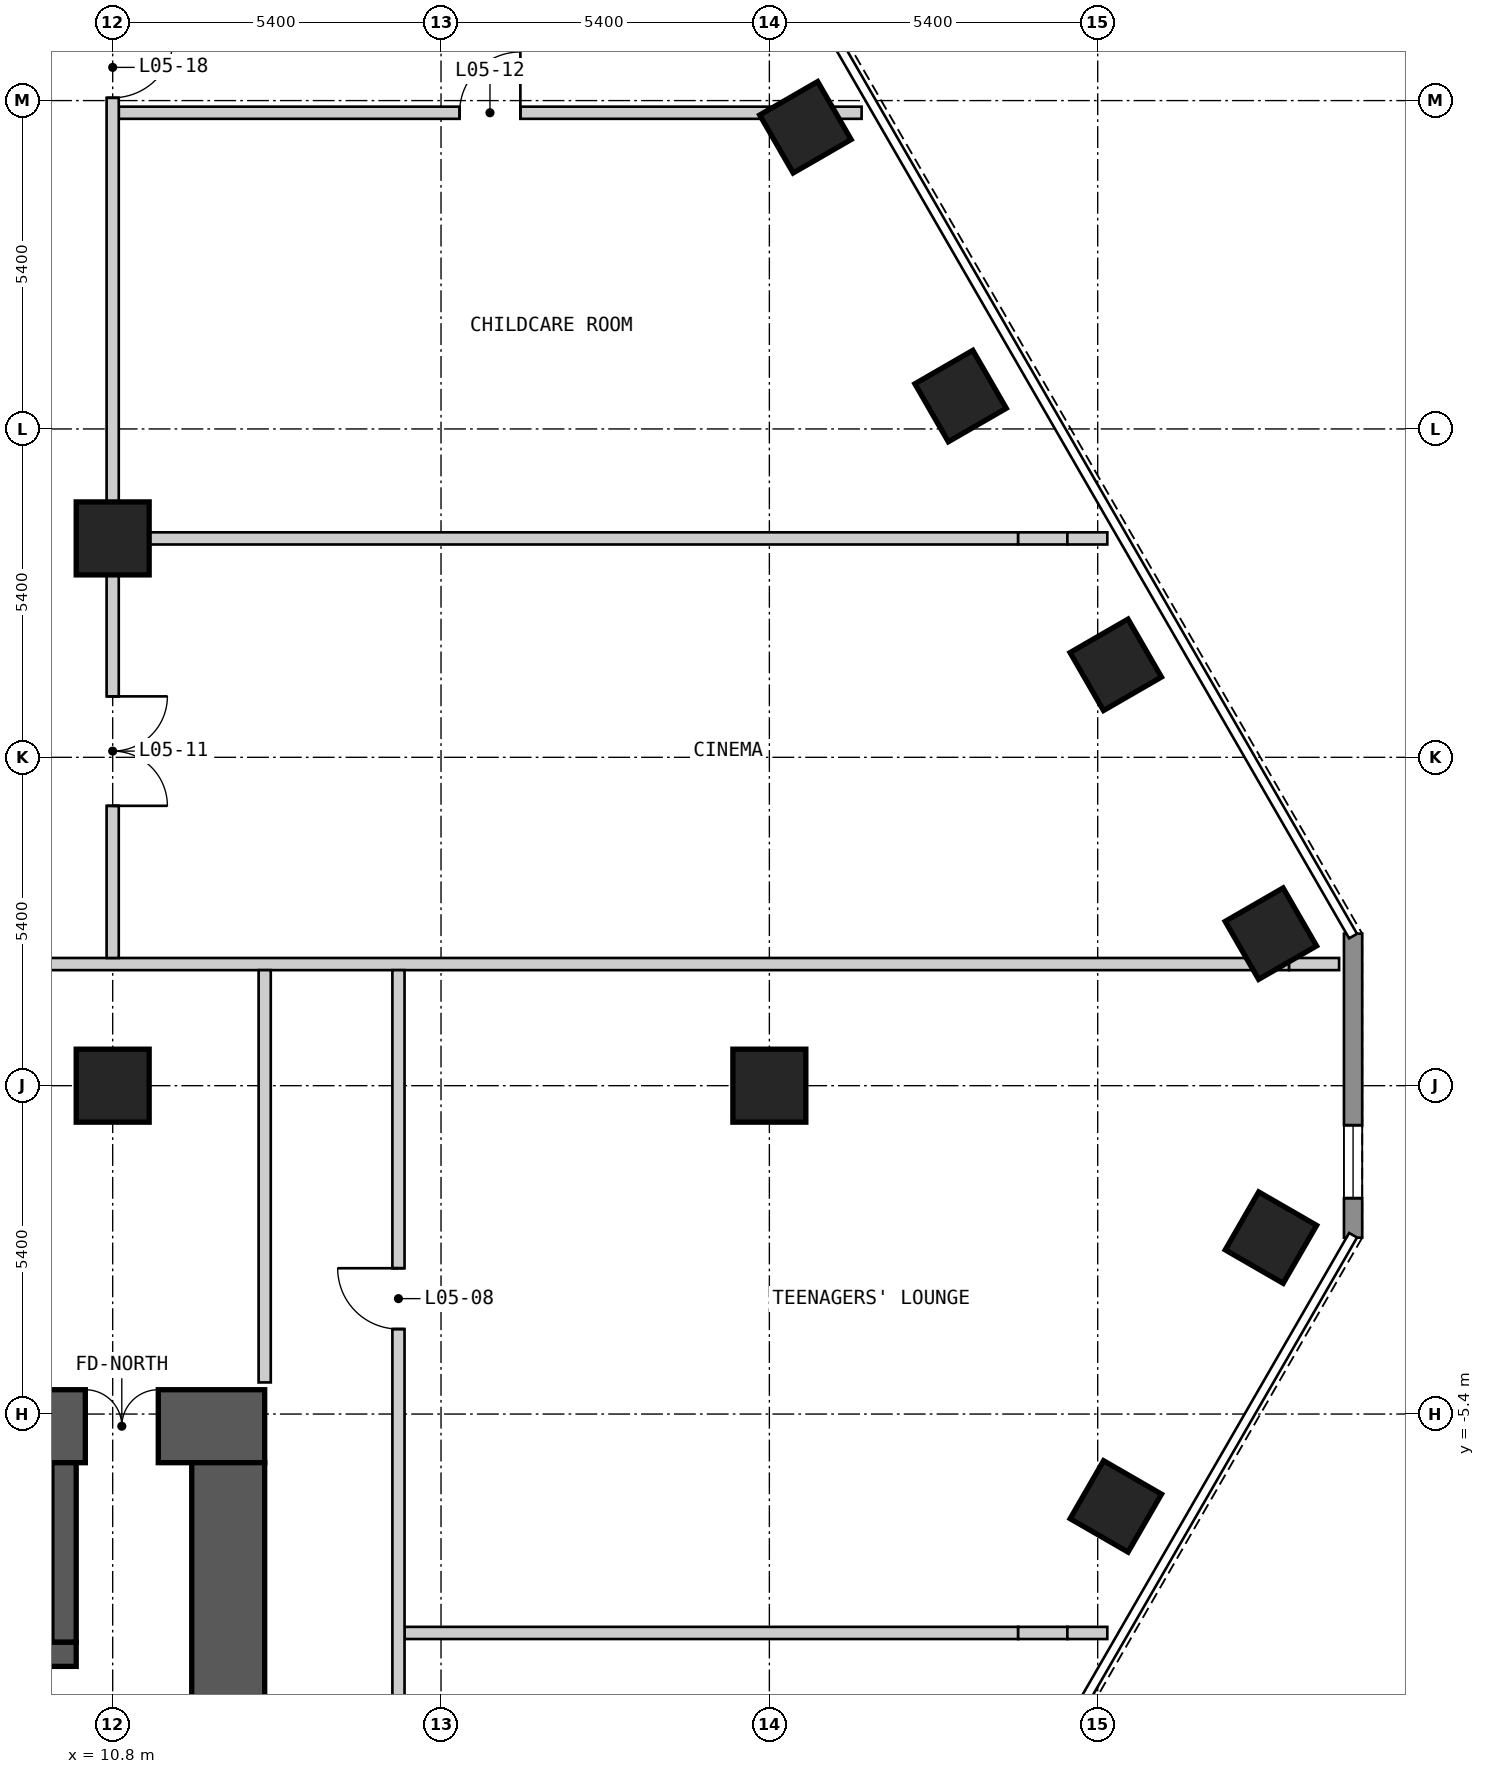
"""IFC4 building model, lengths in metres.
Left out: names, types, materials, properties, quantities, classifications, styles, units other than length and angle.
Written with IfcOpenShell. Run it as: python <this file> out.ifc"""

import sys

from ifc_helpers import new_model, si_unit, direction, frame, frame_2d, origin, origin_2d, place, context, subcontext, project, spatial, polyline, rectangle, outline, extrude, element, fill, save


model = new_model("IFC4")
c1 = context("Model", 3, precision=1e-05, world=origin(), true_north=direction((0.0, 1.0)))
c2 = subcontext(c1, "Body", "Model", "MODEL_VIEW")
j1 = project(units=[si_unit("LENGTHUNIT", "METRE"), si_unit("PLANEANGLEUNIT", "RADIAN")], contexts=[c1])
p1 = place(None, origin())
s1 = spatial("IfcSite", under=j1, at=p1, CompositionType="ELEMENT")
p2 = place(p1, origin())
s2 = spatial("IfcBuilding", under=s1, at=p2, CompositionType="ELEMENT")
p3 = place(p2, frame((0.0, 0.0, 19.8)))
s3 = spatial("IfcBuildingStorey", under=s2, at=p3, CompositionType="ELEMENT", Elevation=19.8)
for number, where, z_axis, x_axis in (
    (1, (27.298, -6.919, 0.0), (0.0, 0.0, 1.0), (0.5, 0.866, 0.0)),
    (2, (29.849, -2.499, 0.0), (0.0, 0.0, 1.0), (0.5, 0.866, 0.0)),
    (3, (29.848, 2.5, 0.0), (0.0, 0.0, 1.0), (-0.5, 0.866, 0.0)),
    (4, (27.297, 6.921, 0.0), (0.0, 0.0, 1.0), (-0.5, 0.866, 0.0)),
    (5, (24.745, 11.341, 0.0), (0.0, 0.0, 1.0), (-0.5, 0.866, 0.0)),
    (6, (22.193, 15.761, 0.0), (0.0, 0.0, 1.0), (-0.5, 0.866, 0.0)),
):
    element("IfcColumn", number, at=place(p3, frame(where, z_axis=z_axis, x_axis=x_axis)), inside=s3, PredefinedType="COLUMN", context=c2, shape_type="SweptSolid", body=[
        extrude(rectangle(XDim=1.1, YDim=1.1, at=origin_2d()), origin(), (0.0, 0.0, 1.0), 3.6),
    ])
for number, where, z_axis, x_axis in (
    (7, (10.8, 0.0, 0.0), (0.0, 0.0, 1.0), (1.0, 0.0, 0.0)),
    (8, (10.8, 9.0, 0.0), (0.0, 0.0, 1.0), (1.0, 0.0, 0.0)),
    (9, (21.6, 0.0, 0.0), (0.0, 0.0, 1.0), (1.0, 0.0, 0.0)),
):
    element("IfcColumn", number, at=place(p3, frame(where, z_axis=z_axis, x_axis=x_axis)), inside=s3, PredefinedType="COLUMN", context=c2, shape_type="SweptSolid", body=[
        extrude(rectangle(XDim=1.2, YDim=1.2, at=origin_2d()), origin(), (0.0, 0.0, 1.0), 3.6),
    ])
p4 = place(p3, frame((-13.3, -5.6, 0.0), z_axis=(0.0, 0.0, 1.0), x_axis=(1.0, 0.0, 0.0)))
e10 = element("IfcWall", 10, at=p4, inside=s3, PredefinedType="SHEAR", context=c2, shape_type="SweptSolid", body=[
    extrude(rectangle(XDim=26.6, YDim=1.2, at=frame_2d((13.3, 0.0))), origin(), (0.0, 0.0, 1.0), 2.8),
])
p5 = place(p4, frame((23.65, 0.0, 0.0)))
e11 = element("IfcOpeningElement", 11, at=p5, cuts=e10, PredefinedType="OPENING", context=c2, shape_type="SweptSolid", body=[
    extrude(rectangle(XDim=1.2, YDim=2.1, at=frame_2d((0.6, 1.05))), frame((0.0, 0.61, 0.0), z_axis=(0.0, -1.0, 0.0), x_axis=(1.0, 0.0, 0.0)), (0.0, 0.0, 1.0), 1.22),
])
p6 = place(p3, frame((12.7, -17.8, 0.0), z_axis=(0.0, 0.0, 1.0), x_axis=(0.0, 1.0, 0.0)))
e12 = element("IfcWall", 12, at=p6, inside=s3, PredefinedType="SHEAR", context=c2, shape_type="SweptSolid", body=[
    extrude(rectangle(XDim=11.6, YDim=1.2, at=frame_2d((5.8, 0.0))), origin(), (0.0, 0.0, 1.0), 2.8),
])
p7 = place(p3, frame((-12.1, -9.35, 0.0), z_axis=(0.0, 0.0, 1.0), x_axis=(1.0, 0.0, 0.0)))
e13 = element("IfcWall", 13, at=p7, inside=s3, PredefinedType="SHEAR", context=c2, shape_type="SweptSolid", body=[
    extrude(rectangle(XDim=22.3, YDim=0.4, at=frame_2d((11.15, 0.0))), origin(), (0.0, 0.0, 1.0), 2.8),
])
p8 = place(p7, frame((0.7, 0.0, 0.0)))
e14 = element("IfcOpeningElement", 14, at=p8, cuts=e13, PredefinedType="OPENING", context=c2, shape_type="SweptSolid", body=[
    extrude(rectangle(XDim=1.1, YDim=2.1, at=frame_2d((0.55, 1.05))), frame((0.0, 0.21, 0.0), z_axis=(0.0, -1.0, 0.0), x_axis=(1.0, 0.0, 0.0)), (0.0, 0.0, 1.0), 0.42),
])
p9 = place(p7, frame((3.5, 0.0, 0.0)))
e15 = element("IfcOpeningElement", 15, at=p9, cuts=e13, PredefinedType="OPENING", context=c2, shape_type="SweptSolid", body=[
    extrude(rectangle(XDim=1.1, YDim=2.1, at=frame_2d((0.55, 1.05))), frame((0.0, 0.21, 0.0), z_axis=(0.0, -1.0, 0.0), x_axis=(1.0, 0.0, 0.0)), (0.0, 0.0, 1.0), 0.42),
])
p10 = place(p7, frame((6.3, 0.0, 0.0)))
e16 = element("IfcOpeningElement", 16, at=p10, cuts=e13, PredefinedType="OPENING", context=c2, shape_type="SweptSolid", body=[
    extrude(rectangle(XDim=1.1, YDim=2.1, at=frame_2d((0.55, 1.05))), frame((0.0, 0.21, 0.0), z_axis=(0.0, -1.0, 0.0), x_axis=(1.0, 0.0, 0.0)), (0.0, 0.0, 1.0), 0.42),
])
p11 = place(p7, frame((8.6, 0.0, 0.0)))
e17 = element("IfcOpeningElement", 17, at=p11, cuts=e13, PredefinedType="OPENING", context=c2, shape_type="SweptSolid", body=[
    extrude(rectangle(XDim=1.1, YDim=2.1, at=frame_2d((0.55, 1.05))), frame((0.0, 0.21, 0.0), z_axis=(0.0, -1.0, 0.0), x_axis=(1.0, 0.0, 0.0)), (0.0, 0.0, 1.0), 0.42),
])
p12 = place(p7, frame((10.9, 0.0, 0.0)))
e18 = element("IfcOpeningElement", 18, at=p12, cuts=e13, PredefinedType="OPENING", context=c2, shape_type="SweptSolid", body=[
    extrude(rectangle(XDim=1.1, YDim=2.1, at=frame_2d((0.55, 1.05))), frame((0.0, 0.21, 0.0), z_axis=(0.0, -1.0, 0.0), x_axis=(1.0, 0.0, 0.0)), (0.0, 0.0, 1.0), 0.42),
])
p13 = place(p7, frame((13.2, 0.0, 0.0)))
e19 = element("IfcOpeningElement", 19, at=p13, cuts=e13, PredefinedType="OPENING", context=c2, shape_type="SweptSolid", body=[
    extrude(rectangle(XDim=1.1, YDim=2.1, at=frame_2d((0.55, 1.05))), frame((0.0, 0.21, 0.0), z_axis=(0.0, -1.0, 0.0), x_axis=(1.0, 0.0, 0.0)), (0.0, 0.0, 1.0), 0.42),
])
p14 = place(p7, frame((15.5, 0.0, 0.0)))
e20 = element("IfcOpeningElement", 20, at=p14, cuts=e13, PredefinedType="OPENING", context=c2, shape_type="SweptSolid", body=[
    extrude(rectangle(XDim=1.1, YDim=2.1, at=frame_2d((0.55, 1.05))), frame((0.0, 0.21, 0.0), z_axis=(0.0, -1.0, 0.0), x_axis=(1.0, 0.0, 0.0)), (0.0, 0.0, 1.0), 0.42),
])
p15 = place(p7, frame((17.8, 0.0, 0.0)))
e21 = element("IfcOpeningElement", 21, at=p15, cuts=e13, PredefinedType="OPENING", context=c2, shape_type="SweptSolid", body=[
    extrude(rectangle(XDim=1.1, YDim=2.1, at=frame_2d((0.55, 1.05))), frame((0.0, 0.21, 0.0), z_axis=(0.0, -1.0, 0.0), x_axis=(1.0, 0.0, 0.0)), (0.0, 0.0, 1.0), 0.42),
])
p16 = place(p7, frame((20.2, 0.0, 0.0)))
e22 = element("IfcOpeningElement", 22, at=p16, cuts=e13, PredefinedType="OPENING", context=c2, shape_type="SweptSolid", body=[
    extrude(rectangle(XDim=1.1, YDim=2.1, at=frame_2d((0.55, 1.05))), frame((0.0, 0.21, 0.0), z_axis=(0.0, -1.0, 0.0), x_axis=(1.0, 0.0, 0.0)), (0.0, 0.0, 1.0), 0.42),
])
p17 = place(p3, frame((10.0, -9.15, 0.0), z_axis=(0.0, 0.0, 1.0), x_axis=(0.0, 1.0, 0.0)))
e23 = element("IfcWall", 23, at=p17, inside=s3, PredefinedType="SHEAR", context=c2, shape_type="SweptSolid", body=[
    extrude(rectangle(XDim=2.95, YDim=0.4, at=frame_2d((1.475, 0.0))), origin(), (0.0, 0.0, 1.0), 2.8),
])
p18 = place(p3, frame((31.2, -2.5, 0.0), z_axis=(0.0, 0.0, 1.0), x_axis=(0.0, 1.0, 0.0)))
e24 = element("IfcWall", 24, at=p18, inside=s3, PredefinedType="SOLIDWALL", context=c2, shape_type="SweptSolid", body=[
    extrude(outline(polyline([(0.0, -0.15), (5.0, -0.15), (4.92, 0.15), (0.08, 0.15), (0.0, -0.15)])), origin(), (0.0, 0.0, 1.0), 2.8),
])
p19 = place(p18, frame((0.65, 0.0, 0.15)))
e25 = element("IfcOpeningElement", 25, at=p19, cuts=e24, PredefinedType="OPENING", context=c2, shape_type="SweptSolid", body=[
    extrude(rectangle(XDim=1.2, YDim=2.1, at=frame_2d((0.6, 1.05))), frame((0.0, 0.16, 0.0), z_axis=(0.0, -1.0, 0.0), x_axis=(1.0, 0.0, 0.0)), (0.0, 0.0, 1.0), 0.32),
])
p20 = place(p3, frame((15.6, -9.0, 0.0), z_axis=(0.0, 0.0, 1.0), x_axis=(1.0, 0.0, 0.0)))
e26 = element("IfcWall", 26, at=p20, inside=s3, PredefinedType="PARTITIONING", context=c2, shape_type="SweptSolid", body=[
    extrude(rectangle(XDim=10.092, YDim=0.2, at=frame_2d((5.046, 0.0))), origin(), (0.0, 0.0, 1.0), 2.8),
])
p21 = place(p3, frame((25.692, -9.0, 0.0), z_axis=(0.0, 0.0, 1.0), x_axis=(1.0, 0.0, 0.0)))
e27 = element("IfcWall", 27, at=p21, inside=s3, PredefinedType="PARTITIONING", context=c2, shape_type="SweptSolid", body=[
    extrude(rectangle(XDim=0.809, YDim=0.2, at=frame_2d((0.405, 0.0))), origin(), (0.0, 0.0, 1.0), 2.07),
])
p22 = place(p3, frame((26.501, -9.0, 0.0), z_axis=(0.0, 0.0, 1.0), x_axis=(1.0, 0.0, 0.0)))
e28 = element("IfcWall", 28, at=p22, inside=s3, PredefinedType="PARTITIONING", context=c2, shape_type="SweptSolid", body=[
    extrude(rectangle(XDim=0.657, YDim=0.2, at=frame_2d((0.329, 0.0))), origin(), (0.0, 0.0, 1.0), 2.8),
])
p23 = place(p3, frame((-29.549, 2.0, 0.0), z_axis=(0.0, 0.0, 1.0), x_axis=(1.0, 0.0, 0.0)))
e29 = element("IfcWall", 29, at=p23, inside=s3, PredefinedType="PARTITIONING", context=c2, shape_type="SweptSolid", body=[
    extrude(rectangle(XDim=59.097, YDim=0.2, at=frame_2d((29.549, 0.0))), origin(), (0.0, 0.0, 1.0), 2.8),
])
p24 = place(p23, frame((21.517, 0.0, 0.0)))
e30 = element("IfcOpeningElement", 30, at=p24, cuts=e29, PredefinedType="OPENING", context=c2, shape_type="SweptSolid", body=[
    extrude(rectangle(XDim=1.8, YDim=2.1, at=frame_2d((0.9, 1.05))), frame((0.0, 0.11, 0.0), z_axis=(0.0, -1.0, 0.0), x_axis=(1.0, 0.0, 0.0)), (0.0, 0.0, 1.0), 0.22),
])
p25 = place(p23, frame((35.781, 0.0, 0.0)))
e31 = element("IfcOpeningElement", 31, at=p25, cuts=e29, PredefinedType="OPENING", context=c2, shape_type="SweptSolid", body=[
    extrude(rectangle(XDim=1.8, YDim=2.1, at=frame_2d((0.9, 1.05))), frame((0.0, 0.11, 0.0), z_axis=(0.0, -1.0, 0.0), x_axis=(1.0, 0.0, 0.0)), (0.0, 0.0, 1.0), 0.22),
])
p26 = place(p3, frame((29.548, 2.0, 0.0), z_axis=(0.0, 0.0, 1.0), x_axis=(1.0, 0.0, 0.0)))
e32 = element("IfcWall", 32, at=p26, inside=s3, PredefinedType="PARTITIONING", context=c2, shape_type="SweptSolid", body=[
    extrude(rectangle(XDim=0.6, YDim=0.2, at=frame_2d((0.3, 0.0))), origin(), (0.0, 0.0, 1.0), 2.07),
])
p27 = place(p3, frame((30.148, 2.0, 0.0), z_axis=(0.0, 0.0, 1.0), x_axis=(1.0, 0.0, 0.0)))
e33 = element("IfcWall", 33, at=p27, inside=s3, PredefinedType="PARTITIONING", context=c2, shape_type="SweptSolid", body=[
    extrude(rectangle(XDim=0.822, YDim=0.2, at=frame_2d((0.411, 0.0))), origin(), (0.0, 0.0, 1.0), 2.8),
])
p28 = place(p3, frame((10.9, 9.0, 0.0), z_axis=(0.0, 0.0, 1.0), x_axis=(1.0, 0.0, 0.0)))
e34 = element("IfcWall", 34, at=p28, inside=s3, PredefinedType="PARTITIONING", context=c2, shape_type="SweptSolid", body=[
    extrude(rectangle(XDim=14.792, YDim=0.2, at=frame_2d((7.396, 0.0))), origin(), (0.0, 0.0, 1.0), 2.8),
])
p29 = place(p3, frame((25.692, 9.0, 0.0), z_axis=(0.0, 0.0, 1.0), x_axis=(1.0, 0.0, 0.0)))
e35 = element("IfcWall", 35, at=p29, inside=s3, PredefinedType="PARTITIONING", context=c2, shape_type="SweptSolid", body=[
    extrude(rectangle(XDim=0.809, YDim=0.2, at=frame_2d((0.405, 0.0))), origin(), (0.0, 0.0, 1.0), 2.07),
])
p30 = place(p3, frame((26.501, 9.0, 0.0), z_axis=(0.0, 0.0, 1.0), x_axis=(1.0, 0.0, 0.0)))
e36 = element("IfcWall", 36, at=p30, inside=s3, PredefinedType="PARTITIONING", context=c2, shape_type="SweptSolid", body=[
    extrude(rectangle(XDim=0.657, YDim=0.2, at=frame_2d((0.329, 0.0))), origin(), (0.0, 0.0, 1.0), 2.8),
])
p31 = place(p3, frame((10.9, 16.0, 0.0), z_axis=(0.0, 0.0, 1.0), x_axis=(1.0, 0.0, 0.0)))
e37 = element("IfcWall", 37, at=p31, inside=s3, PredefinedType="PARTITIONING", context=c2, shape_type="SweptSolid", body=[
    extrude(rectangle(XDim=10.751, YDim=0.2, at=frame_2d((5.375, 0.0))), origin(), (0.0, 0.0, 1.0), 2.8),
])
p32 = place(p31, frame((6.605, 0.0, 0.0), z_axis=(0.0, 0.0, 1.0), x_axis=(-1.0, 0.0, 0.0)))
e38 = element("IfcOpeningElement", 38, at=p32, cuts=e37, PredefinedType="OPENING", context=c2, shape_type="SweptSolid", body=[
    extrude(rectangle(XDim=1.0, YDim=2.1, at=frame_2d((0.5, 1.05))), frame((0.0, 0.11, 0.0), z_axis=(0.0, -1.0, 0.0), x_axis=(1.0, 0.0, 0.0)), (0.0, 0.0, 1.0), 0.22),
])
p33 = place(p3, frame((21.651, 16.0, 0.0), z_axis=(0.0, 0.0, 1.0), x_axis=(1.0, 0.0, 0.0)))
e39 = element("IfcWall", 39, at=p33, inside=s3, PredefinedType="PARTITIONING", context=c2, shape_type="SweptSolid", body=[
    extrude(rectangle(XDim=0.802, YDim=0.2, at=frame_2d((0.401, 0.0))), origin(), (0.0, 0.0, 1.0), 2.07),
])
p34 = place(p3, frame((22.453, 16.0, 0.0), z_axis=(0.0, 0.0, 1.0), x_axis=(1.0, 0.0, 0.0)))
e40 = element("IfcWall", 40, at=p34, inside=s3, PredefinedType="PARTITIONING", context=c2, shape_type="SweptSolid", body=[
    extrude(rectangle(XDim=0.664, YDim=0.2, at=frame_2d((0.332, 0.0))), origin(), (0.0, 0.0, 1.0), 2.8),
])
p35 = place(p3, frame((10.8, 2.1, 0.0), z_axis=(0.0, 0.0, 1.0), x_axis=(0.0, 1.0, 0.0)))
e41 = element("IfcWall", 41, at=p35, inside=s3, PredefinedType="PARTITIONING", context=c2, shape_type="SweptSolid", body=[
    extrude(rectangle(XDim=24.7, YDim=0.2, at=frame_2d((12.35, 0.0))), origin(), (0.0, 0.0, 1.0), 2.8),
])
p36 = place(p35, frame((4.302, 0.0, 0.0), z_axis=(0.0, 0.0, 1.0), x_axis=(-1.0, 0.0, 0.0)))
e42 = element("IfcOpeningElement", 42, at=p36, cuts=e41, PredefinedType="OPENING", context=c2, shape_type="SweptSolid", body=[
    extrude(rectangle(XDim=1.8, YDim=2.1, at=frame_2d((0.9, 1.05))), frame((0.0, 0.11, 0.0), z_axis=(0.0, -1.0, 0.0), x_axis=(1.0, 0.0, 0.0)), (0.0, 0.0, 1.0), 0.22),
])
p37 = place(p35, frame((14.146, 0.0, 0.0)))
e43 = element("IfcOpeningElement", 43, at=p37, cuts=e41, PredefinedType="OPENING", context=c2, shape_type="SweptSolid", body=[
    extrude(rectangle(XDim=1.0, YDim=2.1, at=frame_2d((0.5, 1.05))), frame((0.0, 0.11, 0.0), z_axis=(0.0, -1.0, 0.0), x_axis=(1.0, 0.0, 0.0)), (0.0, 0.0, 1.0), 0.22),
])
p38 = place(p3, frame((13.3, -4.88, 0.0), z_axis=(0.0, 0.0, 1.0), x_axis=(0.0, 1.0, 0.0)))
e44 = element("IfcWall", 44, at=p38, inside=s3, PredefinedType="PARTITIONING", context=c2, shape_type="SweptSolid", body=[
    extrude(rectangle(XDim=6.78, YDim=0.2, at=frame_2d((3.39, 0.0))), origin(), (0.0, 0.0, 1.0), 2.8),
])
p39 = place(p3, frame((15.5, -25.114, 0.0), z_axis=(0.0, 0.0, 1.0), x_axis=(0.0, 1.0, 0.0)))
e45 = element("IfcWall", 45, at=p39, inside=s3, PredefinedType="PARTITIONING", context=c2, shape_type="SweptSolid", body=[
    extrude(rectangle(XDim=27.014, YDim=0.2, at=frame_2d((13.507, 0.0))), origin(), (0.0, 0.0, 1.0), 2.8),
])
p40 = place(p39, frame((10.516, 0.0, 0.0), z_axis=(0.0, 0.0, 1.0), x_axis=(-1.0, 0.0, 0.0)))
e46 = element("IfcOpeningElement", 46, at=p40, cuts=e45, PredefinedType="OPENING", context=c2, shape_type="SweptSolid", body=[
    extrude(rectangle(XDim=1.0, YDim=2.1, at=frame_2d((0.5, 1.05))), frame((0.0, 0.11, 0.0), z_axis=(0.0, -1.0, 0.0), x_axis=(1.0, 0.0, 0.0)), (0.0, 0.0, 1.0), 0.22),
])
p41 = place(p39, frame((22.112, 0.0, 0.0), z_axis=(0.0, 0.0, 1.0), x_axis=(-1.0, 0.0, 0.0)))
e47 = element("IfcOpeningElement", 47, at=p41, cuts=e45, PredefinedType="OPENING", context=c2, shape_type="SweptSolid", body=[
    extrude(rectangle(XDim=1.0, YDim=2.1, at=frame_2d((0.5, 1.05))), frame((0.0, 0.11, 0.0), z_axis=(0.0, -1.0, 0.0), x_axis=(1.0, 0.0, 0.0)), (0.0, 0.0, 1.0), 0.22),
])
p42 = place(p19, origin())
e48 = element("IfcWindow", 48, at=p42, inside=s3, PartitioningType="SINGLE_PANEL", PredefinedType="WINDOW", context=c2, shape_type="SweptSolid", body=[
    extrude(rectangle(XDim=1.2, YDim=2.1, at=frame_2d((0.6, 1.05))), frame((0.0, 0.03, 0.0), z_axis=(0.0, -1.0, 0.0), x_axis=(1.0, 0.0, 0.0)), (0.0, 0.0, 1.0), 0.06),
])
fill(e25, e48)
p43 = place(p41, origin())
e49 = element("IfcDoor", 49, at=p43, inside=s3, OperationType="SINGLE_SWING_LEFT", PredefinedType="DOOR", context=c2, shape_type="SweptSolid", body=[
    extrude(rectangle(XDim=1.0, YDim=2.1, at=frame_2d((0.5, 1.05))), frame((0.0, 0.025, 0.0), z_axis=(0.0, -1.0, 0.0), x_axis=(1.0, 0.0, 0.0)), (0.0, 0.0, 1.0), 0.05),
])
fill(e47, e49)
p44 = place(p36, origin())
e50 = element("IfcDoor", 50, at=p44, inside=s3, OperationType="DOUBLE_DOOR_SINGLE_SWING", PredefinedType="DOOR", context=c2, shape_type="SweptSolid", body=[
    extrude(rectangle(XDim=1.8, YDim=2.1, at=frame_2d((0.9, 1.05))), frame((0.0, 0.025, 0.0), z_axis=(0.0, -1.0, 0.0), x_axis=(1.0, 0.0, 0.0)), (0.0, 0.0, 1.0), 0.05),
])
fill(e42, e50)
p45 = place(p32, origin())
e51 = element("IfcDoor", 51, at=p45, inside=s3, OperationType="SINGLE_SWING_LEFT", PredefinedType="DOOR", context=c2, shape_type="SweptSolid", body=[
    extrude(rectangle(XDim=1.0, YDim=2.1, at=frame_2d((0.5, 1.05))), frame((0.0, 0.025, 0.0), z_axis=(0.0, -1.0, 0.0), x_axis=(1.0, 0.0, 0.0)), (0.0, 0.0, 1.0), 0.05),
])
fill(e38, e51)
p46 = place(p37, origin())
e52 = element("IfcDoor", 52, at=p46, inside=s3, OperationType="SINGLE_SWING_RIGHT", PredefinedType="DOOR", context=c2, shape_type="SweptSolid", body=[
    extrude(rectangle(XDim=1.0, YDim=2.1, at=frame_2d((0.5, 1.05))), frame((0.0, 0.025, 0.0), z_axis=(0.0, -1.0, 0.0), x_axis=(1.0, 0.0, 0.0)), (0.0, 0.0, 1.0), 0.05),
])
fill(e43, e52)
p47 = place(p5, origin())
e53 = element("IfcDoor", 53, at=p47, inside=s3, OperationType="DOUBLE_DOOR_SINGLE_SWING", PredefinedType="DOOR", context=c2, shape_type="SweptSolid", body=[
    extrude(rectangle(XDim=1.2, YDim=2.1, at=frame_2d((0.6, 1.05))), frame((0.0, 0.025, 0.0), z_axis=(0.0, -1.0, 0.0), x_axis=(1.0, 0.0, 0.0)), (0.0, 0.0, 1.0), 0.05),
])
fill(e11, e53)
save(model, sys.argv[1])
